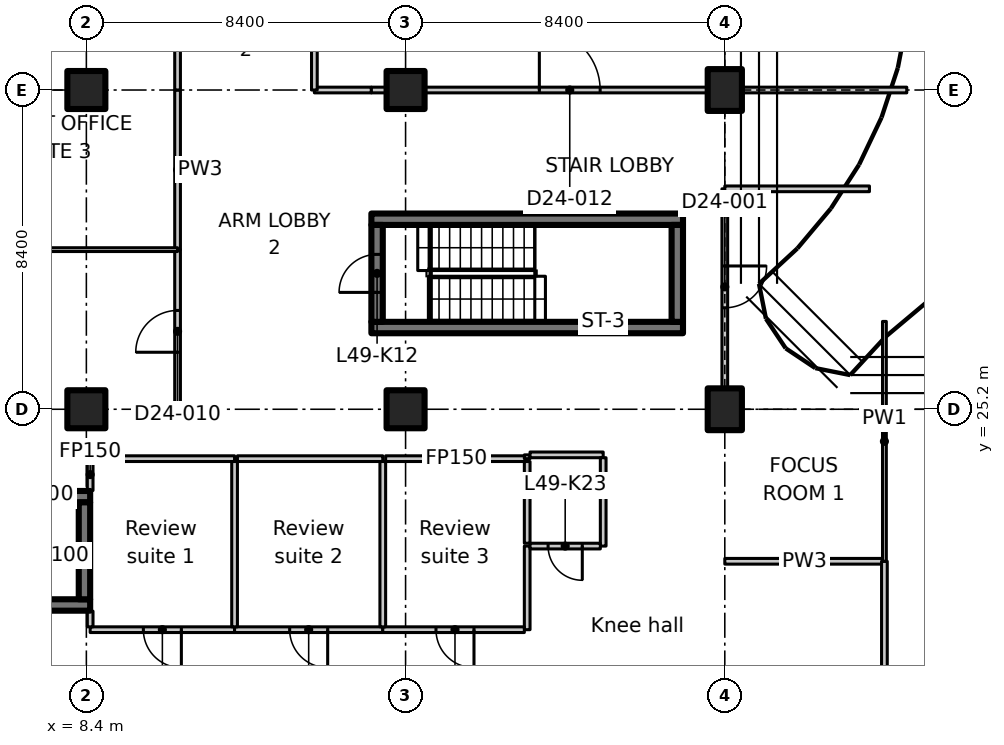
"""IFC4 building model, lengths in metres.
Left out: names, types, materials, properties, quantities, classifications, styles, units other than length and angle.
Written with IfcOpenShell. Run it as: python <this file> out.ifc"""

import sys

from ifc_helpers import new_model, si_unit, direction, frame, frame_2d, origin, origin_2d, place, context, subcontext, project, spatial, polyline, rectangle, outline, extrude, element, fill, save


model = new_model("IFC4")
c1 = context("Model", 3, precision=1e-05, world=origin(), true_north=direction((0.0, 1.0)))
c2 = subcontext(c1, "Body", "Model", "MODEL_VIEW")
j1 = project(units=[si_unit("LENGTHUNIT", "METRE"), si_unit("PLANEANGLEUNIT", "RADIAN")], contexts=[c1])
p1 = place(None, origin())
s1 = spatial("IfcSite", under=j1, at=p1, CompositionType="ELEMENT")
p2 = place(p1, origin())
s2 = spatial("IfcBuilding", under=s1, at=p2, CompositionType="ELEMENT")
p3 = place(p2, frame((0.0, 0.0, 195.6)))
s3 = spatial("IfcBuildingStorey", under=s2, at=p3, CompositionType="ELEMENT", Elevation=195.6)
for number, where, z_axis, x_axis in (
    (1, (8.4, 25.2, 0.0), (0.0, 0.0, 1.0), (1.0, 0.0, 0.0)),
    (2, (8.4, 33.6, 0.0), (0.0, 0.0, 1.0), (1.0, 0.0, 0.0)),
    (3, (16.8, 25.2, 0.0), (0.0, 0.0, 1.0), (1.0, 0.0, 0.0)),
    (4, (16.8, 33.6, 0.0), (0.0, 0.0, 1.0), (1.0, 0.0, 0.0)),
):
    element("IfcColumn", number, at=place(p3, frame(where, z_axis=z_axis, x_axis=x_axis)), inside=s3, PredefinedType="COLUMN", context=c2, shape_type="SweptSolid", body=[
        extrude(rectangle(XDim=1.0, YDim=1.0, at=origin_2d()), origin(), (0.0, 0.0, 1.0), 3.35),
    ])
for number, where, z_axis, x_axis in (
    (5, (25.2, 25.2, 0.0), (0.0, 0.0, 1.0), (1.0, 0.0, 0.0)),
    (6, (25.2, 33.6, 0.0), (0.0, 0.0, 1.0), (1.0, 0.0, 0.0)),
):
    element("IfcColumn", number, at=place(p3, frame(where, z_axis=z_axis, x_axis=x_axis)), inside=s3, PredefinedType="COLUMN", context=c2, shape_type="SweptSolid", body=[
        extrude(rectangle(XDim=0.9, YDim=1.1, at=origin_2d()), origin(), (0.0, 0.0, 1.0), 3.35),
    ])
p4 = place(p3, frame((8.5, 20.05, 0.0), z_axis=(0.0, 0.0, 1.0), x_axis=(-1.0, 0.0, 0.0)))
e7 = element("IfcWall", 7, at=p4, inside=s3, PredefinedType="SHEAR", context=c2, shape_type="SweptSolid", body=[
    extrude(rectangle(XDim=8.2, YDim=0.3, at=frame_2d((4.1, 0.0))), origin(), (0.0, 0.0, 1.0), 3.35),
])
p5 = place(p4, frame((6.8, 0.0, 0.0)))
e8 = element("IfcOpeningElement", 8, at=p5, cuts=e7, PredefinedType="OPENING", context=c2, shape_type="SweptSolid", body=[
    extrude(rectangle(XDim=1.0, YDim=2.1, at=frame_2d((0.5, 1.05))), frame((0.0, 0.16, 0.0), z_axis=(0.0, -1.0, 0.0), x_axis=(1.0, 0.0, 0.0)), (0.0, 0.0, 1.0), 0.32),
])
p6 = place(p3, frame((0.3, 22.9, 0.0), z_axis=(0.0, 0.0, 1.0), x_axis=(1.0, 0.0, 0.0)))
e9 = element("IfcWall", 9, at=p6, inside=s3, PredefinedType="SHEAR", context=c2, shape_type="SweptSolid", body=[
    extrude(rectangle(XDim=8.2, YDim=0.3, at=frame_2d((4.1, 0.0))), origin(), (0.0, 0.0, 1.0), 3.35),
])
p7 = place(p6, frame((0.4, 0.0, 0.0)))
e10 = element("IfcOpeningElement", 10, at=p7, cuts=e9, PredefinedType="OPENING", context=c2, shape_type="SweptSolid", body=[
    extrude(rectangle(XDim=1.0, YDim=2.1, at=frame_2d((0.5, 1.05))), frame((0.0, 0.16, 0.0), z_axis=(0.0, -1.0, 0.0), x_axis=(1.0, 0.0, 0.0)), (0.0, 0.0, 1.0), 0.32),
])
p8 = place(p3, frame((8.35, 20.2, 0.0), z_axis=(0.0, 0.0, 1.0), x_axis=(0.0, 1.0, 0.0)))
e11 = element("IfcWall", 11, at=p8, inside=s3, PredefinedType="SHEAR", context=c2, shape_type="SweptSolid", body=[
    extrude(rectangle(XDim=2.55, YDim=0.3, at=frame_2d((1.275, 0.0))), origin(), (0.0, 0.0, 1.0), 3.35),
])
for number, where, z_axis, x_axis in (
    (12, (15.9, 27.35, 0.0), (0.0, 0.0, 1.0), (1.0, 0.0, 0.0)),
    (13, (15.9, 30.2, 0.0), (0.0, 0.0, 1.0), (1.0, 0.0, 0.0)),
):
    element("IfcWall", number, at=place(p3, frame(where, z_axis=z_axis, x_axis=x_axis)), inside=s3, PredefinedType="SHEAR", context=c2, shape_type="SweptSolid", body=[
        extrude(rectangle(XDim=8.2, YDim=0.3, at=frame_2d((4.1, 0.0))), origin(), (0.0, 0.0, 1.0), 3.35),
    ])
p9 = place(p3, frame((16.05, 27.5, 0.0), z_axis=(0.0, 0.0, 1.0), x_axis=(0.0, 1.0, 0.0)))
e14 = element("IfcWall", 14, at=p9, inside=s3, PredefinedType="SHEAR", context=c2, shape_type="SweptSolid", body=[
    extrude(rectangle(XDim=2.55, YDim=0.3, at=frame_2d((1.275, 0.0))), origin(), (0.0, 0.0, 1.0), 3.35),
])
p10 = place(p9, frame((0.775, 0.0, 0.0)))
e15 = element("IfcOpeningElement", 15, at=p10, cuts=e14, PredefinedType="OPENING", context=c2, shape_type="SweptSolid", body=[
    extrude(rectangle(XDim=1.0, YDim=2.1, at=frame_2d((0.5, 1.05))), frame((0.0, 0.16, 0.0), z_axis=(0.0, -1.0, 0.0), x_axis=(1.0, 0.0, 0.0)), (0.0, 0.0, 1.0), 0.32),
])
p11 = place(p3, frame((23.95, 27.5, 0.0), z_axis=(0.0, 0.0, 1.0), x_axis=(0.0, 1.0, 0.0)))
e16 = element("IfcWall", 16, at=p11, inside=s3, PredefinedType="SHEAR", context=c2, shape_type="SweptSolid", body=[
    extrude(rectangle(XDim=2.55, YDim=0.3, at=frame_2d((1.275, 0.0))), origin(), (0.0, 0.0, 1.0), 3.35),
])
p12 = place(p3, frame((12.3, 19.4, 0.0), z_axis=(0.0, 0.0, 1.0), x_axis=(-1.0, 0.0, 0.0)))
e17 = element("IfcWall", 17, at=p12, inside=s3, PredefinedType="PARTITIONING", context=c2, shape_type="SweptSolid", body=[
    extrude(rectangle(XDim=3.8, YDim=0.15, at=frame_2d((1.9, 0.0))), origin(), (0.0, 0.0, 1.0), 3.35),
])
p13 = place(p12, frame((1.4, 0.0, 0.0)))
e18 = element("IfcOpeningElement", 18, at=p13, cuts=e17, PredefinedType="OPENING", context=c2, shape_type="SweptSolid", body=[
    extrude(rectangle(XDim=1.0, YDim=2.1, at=frame_2d((0.5, 1.05))), frame((0.0, 0.085, 0.0), z_axis=(0.0, -1.0, 0.0), x_axis=(1.0, 0.0, 0.0)), (0.0, 0.0, 1.0), 0.17),
])
p14 = place(p3, frame((8.5, 19.475, 0.0), z_axis=(0.0, 0.0, 1.0), x_axis=(0.0, 1.0, 0.0)))
e19 = element("IfcWall", 19, at=p14, inside=s3, PredefinedType="PARTITIONING", context=c2, shape_type="SweptSolid", body=[
    extrude(rectangle(XDim=0.413, YDim=0.15, at=frame_2d((0.207, 0.0))), origin(), (0.0, 0.0, 1.0), 3.35),
])
p15 = place(p3, frame((8.5, 23.062, 0.0), z_axis=(0.0, 0.0, 1.0), x_axis=(0.0, 1.0, 0.0)))
e20 = element("IfcWall", 20, at=p15, inside=s3, PredefinedType="PARTITIONING", context=c2, shape_type="SweptSolid", body=[
    extrude(rectangle(XDim=0.838, YDim=0.15, at=frame_2d((0.419, 0.0))), origin(), (0.0, 0.0, 1.0), 3.35),
])
p16 = place(p3, frame((8.575, 23.9, 0.0), z_axis=(0.0, 0.0, 1.0), x_axis=(1.0, 0.0, 0.0)))
e21 = element("IfcWall", 21, at=p16, inside=s3, PredefinedType="PARTITIONING", context=c2, shape_type="SweptSolid", body=[
    extrude(rectangle(XDim=3.725, YDim=0.15, at=frame_2d((1.863, 0.0))), origin(), (0.0, 0.0, 1.0), 3.35),
])
p17 = place(p3, frame((16.2, 19.4, 0.0), z_axis=(0.0, 0.0, 1.0), x_axis=(-1.0, 0.0, 0.0)))
e22 = element("IfcWall", 22, at=p17, inside=s3, PredefinedType="PARTITIONING", context=c2, shape_type="SweptSolid", body=[
    extrude(rectangle(XDim=3.9, YDim=0.15, at=frame_2d((1.95, 0.0))), origin(), (0.0, 0.0, 1.0), 3.35),
])
p18 = place(p17, frame((1.45, 0.0, 0.0)))
e23 = element("IfcOpeningElement", 23, at=p18, cuts=e22, PredefinedType="OPENING", context=c2, shape_type="SweptSolid", body=[
    extrude(rectangle(XDim=1.0, YDim=2.1, at=frame_2d((0.5, 1.05))), frame((0.0, 0.085, 0.0), z_axis=(0.0, -1.0, 0.0), x_axis=(1.0, 0.0, 0.0)), (0.0, 0.0, 1.0), 0.17),
])
p19 = place(p3, frame((12.3, 23.825, 0.0), z_axis=(0.0, 0.0, 1.0), x_axis=(0.0, -1.0, 0.0)))
e24 = element("IfcWall", 24, at=p19, inside=s3, PredefinedType="PARTITIONING", context=c2, shape_type="SweptSolid", body=[
    extrude(rectangle(XDim=4.35, YDim=0.15, at=frame_2d((2.175, 0.0))), origin(), (0.0, 0.0, 1.0), 3.35),
])
p20 = place(p3, frame((12.375, 23.9, 0.0), z_axis=(0.0, 0.0, 1.0), x_axis=(1.0, 0.0, 0.0)))
e25 = element("IfcWall", 25, at=p20, inside=s3, PredefinedType="PARTITIONING", context=c2, shape_type="SweptSolid", body=[
    extrude(rectangle(XDim=3.825, YDim=0.15, at=frame_2d((1.913, 0.0))), origin(), (0.0, 0.0, 1.0), 3.35),
])
p21 = place(p3, frame((20.0, 21.6, 0.0), z_axis=(0.0, 0.0, 1.0), x_axis=(0.0, -1.0, 0.0)))
e26 = element("IfcWall", 26, at=p21, inside=s3, PredefinedType="PARTITIONING", context=c2, shape_type="SweptSolid", body=[
    extrude(rectangle(XDim=2.2, YDim=0.15, at=frame_2d((1.1, 0.0))), origin(), (0.0, 0.0, 1.0), 3.35),
])
p22 = place(p3, frame((19.925, 19.4, 0.0), z_axis=(0.0, 0.0, 1.0), x_axis=(-1.0, 0.0, 0.0)))
e27 = element("IfcWall", 27, at=p22, inside=s3, PredefinedType="PARTITIONING", context=c2, shape_type="SweptSolid", body=[
    extrude(rectangle(XDim=3.725, YDim=0.15, at=frame_2d((1.863, 0.0))), origin(), (0.0, 0.0, 1.0), 3.35),
])
p23 = place(p22, frame((1.325, 0.0, 0.0)))
e28 = element("IfcOpeningElement", 28, at=p23, cuts=e27, PredefinedType="OPENING", context=c2, shape_type="SweptSolid", body=[
    extrude(rectangle(XDim=1.0, YDim=2.1, at=frame_2d((0.5, 1.05))), frame((0.0, 0.085, 0.0), z_axis=(0.0, -1.0, 0.0), x_axis=(1.0, 0.0, 0.0)), (0.0, 0.0, 1.0), 0.17),
])
p24 = place(p3, frame((16.2, 23.825, 0.0), z_axis=(0.0, 0.0, 1.0), x_axis=(0.0, -1.0, 0.0)))
e29 = element("IfcWall", 29, at=p24, inside=s3, PredefinedType="PARTITIONING", context=c2, shape_type="SweptSolid", body=[
    extrude(rectangle(XDim=4.35, YDim=0.15, at=frame_2d((2.175, 0.0))), origin(), (0.0, 0.0, 1.0), 3.35),
])
p25 = place(p3, frame((16.275, 23.9, 0.0), z_axis=(0.0, 0.0, 1.0), x_axis=(1.0, 0.0, 0.0)))
e30 = element("IfcWall", 30, at=p25, inside=s3, PredefinedType="PARTITIONING", context=c2, shape_type="SweptSolid", body=[
    extrude(rectangle(XDim=3.725, YDim=0.15, at=frame_2d((1.863, 0.0))), origin(), (0.0, 0.0, 1.0), 3.35),
])
p26 = place(p3, frame((20.0, 23.9, 0.0), z_axis=(0.0, 0.0, 1.0), x_axis=(0.0, 1.0, 0.0)))
e31 = element("IfcWall", 31, at=p26, inside=s3, PredefinedType="PARTITIONING", context=c2, shape_type="SweptSolid", body=[
    extrude(rectangle(XDim=0.1, YDim=0.15, at=frame_2d((0.05, 0.0))), origin(), (0.0, 0.0, 1.0), 3.35),
])
p27 = place(p3, frame((20.075, 24.0, 0.0), z_axis=(0.0, 0.0, 1.0), x_axis=(1.0, 0.0, 0.0)))
e32 = element("IfcWall", 32, at=p27, inside=s3, PredefinedType="PARTITIONING", context=c2, shape_type="SweptSolid", body=[
    extrude(rectangle(XDim=1.925, YDim=0.15, at=frame_2d((0.962, 0.0))), origin(), (0.0, 0.0, 1.0), 3.35),
])
p28 = place(p3, frame((22.0, 23.925, 0.0), z_axis=(0.0, 0.0, 1.0), x_axis=(0.0, -1.0, 0.0)))
e33 = element("IfcWall", 33, at=p28, inside=s3, PredefinedType="PARTITIONING", context=c2, shape_type="SweptSolid", body=[
    extrude(rectangle(XDim=2.325, YDim=0.15, at=frame_2d((1.163, 0.0))), origin(), (0.0, 0.0, 1.0), 3.35),
])
p29 = place(p3, frame((21.925, 21.6, 0.0), z_axis=(0.0, 0.0, 1.0), x_axis=(-1.0, 0.0, 0.0)))
e34 = element("IfcWall", 34, at=p29, inside=s3, PredefinedType="PARTITIONING", context=c2, shape_type="SweptSolid", body=[
    extrude(rectangle(XDim=1.85, YDim=0.15, at=frame_2d((0.925, 0.0))), origin(), (0.0, 0.0, 1.0), 3.35),
])
p30 = place(p29, frame((0.475, 0.0, 0.0)))
e35 = element("IfcOpeningElement", 35, at=p30, cuts=e34, PredefinedType="OPENING", context=c2, shape_type="SweptSolid", body=[
    extrude(rectangle(XDim=0.9, YDim=2.1, at=frame_2d((0.45, 1.05))), frame((0.0, 0.085, 0.0), z_axis=(0.0, -1.0, 0.0), x_axis=(1.0, 0.0, 0.0)), (0.0, 0.0, 1.0), 0.17),
])
p31 = place(p3, frame((20.0, 21.675, 0.0), z_axis=(0.0, 0.0, 1.0), x_axis=(0.0, 1.0, 0.0)))
e36 = element("IfcWall", 36, at=p31, inside=s3, PredefinedType="PARTITIONING", context=c2, shape_type="SweptSolid", body=[
    extrude(rectangle(XDim=2.15, YDim=0.15, at=frame_2d((1.075, 0.0))), origin(), (0.0, 0.0, 1.0), 3.35),
])
p32 = place(p3, frame((25.2, 21.2, 0.0), z_axis=(0.0, 0.0, 1.0), x_axis=(1.0, 0.0, 0.0)))
e37 = element("IfcWall", 37, at=p32, inside=s3, PredefinedType="PARTITIONING", context=c2, shape_type="SweptSolid", body=[
    extrude(rectangle(XDim=4.2, YDim=0.15, at=frame_2d((2.1, 0.0))), origin(), (0.0, 0.0, 1.0), 3.33),
])
p33 = place(p3, frame((29.4, 21.2, 0.0), z_axis=(0.0, 0.0, 1.0), x_axis=(0.0, -1.0, 0.0)))
e38 = element("IfcWall", 38, at=p33, inside=s3, PredefinedType="PARTITIONING", context=c2, shape_type="SweptSolid", body=[
    extrude(rectangle(XDim=8.2, YDim=0.15, at=frame_2d((4.1, 0.0))), origin(), (0.0, 0.0, 1.0), 3.33),
])
p34 = place(p3, frame((29.4, 27.511, 0.0), z_axis=(0.0, 0.0, 1.0), x_axis=(0.0, -1.0, 0.0)))
e39 = element("IfcWall", 39, at=p34, inside=s3, PredefinedType="PARTITIONING", context=c2, shape_type="SweptSolid", body=[
    extrude(outline(polyline([(0.0, 0.0), (6.311, 0.0), (6.311, 3.33), (2.761, 3.33), (2.759, 2.98), (1.863, 2.98), (1.861, 3.33), (0.236, 3.33), (0.0, 3.33), (0.0, 0.0)])), frame((0.0, 0.05, 0.0), z_axis=(0.0, -1.0, 0.0), x_axis=(1.0, 0.0, 0.0)), (0.0, 0.0, 1.0), 0.1),
])
p35 = place(p3, frame((25.2, 31.0, 0.0), z_axis=(0.0, 0.0, 1.0), x_axis=(0.0, -1.0, 0.0)))
e40 = element("IfcWall", 40, at=p35, inside=s3, PredefinedType="PARTITIONING", context=c2, shape_type="SweptSolid", body=[
    extrude(outline(polyline([(0.0, 0.0), (5.23, 0.0), (5.23, 2.98), (0.0, 2.98), (0.0, 0.0)])), frame((0.0, 0.075, 0.0), z_axis=(0.0, -1.0, 0.0), x_axis=(1.0, 0.0, 0.0)), (0.0, 0.0, 1.0), 0.15),
])
p36 = place(p35, frame((2.03, 0.0, 0.0)))
e41 = element("IfcOpeningElement", 41, at=p36, cuts=e40, PredefinedType="OPENING", context=c2, shape_type="SweptSolid", body=[
    extrude(rectangle(XDim=1.1, YDim=2.1, at=frame_2d((0.55, 1.05))), frame((0.0, 0.085, 0.0), z_axis=(0.0, -1.0, 0.0), x_axis=(1.0, 0.0, 0.0)), (0.0, 0.0, 1.0), 0.17),
])
p37 = place(p3, frame((25.2, 31.0, 0.0), z_axis=(0.0, 0.0, 1.0), x_axis=(1.0, 0.0, 0.0)))
e42 = element("IfcWall", 42, at=p37, inside=s3, PredefinedType="PARTITIONING", context=c2, shape_type="SweptSolid", body=[
    extrude(rectangle(XDim=3.806, YDim=0.15, at=frame_2d((1.903, 0.0))), origin(), (0.0, 0.0, 1.0), 2.98),
])
p38 = place(p3, frame((10.8, 25.2, 0.0), z_axis=(0.0, 0.0, 1.0), x_axis=(0.0, 1.0, 0.0)))
e43 = element("IfcWall", 43, at=p38, inside=s3, PredefinedType="PARTITIONING", context=c2, shape_type="SweptSolid", body=[
    extrude(rectangle(XDim=4.2, YDim=0.15, at=frame_2d((2.1, 0.0))), origin(), (0.0, 0.0, 1.0), 3.33),
])
p39 = place(p38, frame((1.5, 0.0, 0.0)))
e44 = element("IfcOpeningElement", 44, at=p39, cuts=e43, PredefinedType="OPENING", context=c2, shape_type="SweptSolid", body=[
    extrude(rectangle(XDim=1.1, YDim=2.1, at=frame_2d((0.55, 1.05))), frame((0.0, 0.085, 0.0), z_axis=(0.0, -1.0, 0.0), x_axis=(1.0, 0.0, 0.0)), (0.0, 0.0, 1.0), 0.17),
])
p40 = place(p3, frame((10.8, 29.4, 0.0), z_axis=(0.0, 0.0, 1.0), x_axis=(0.0, 1.0, 0.0)))
e45 = element("IfcWall", 45, at=p40, inside=s3, PredefinedType="PARTITIONING", context=c2, shape_type="SweptSolid", body=[
    extrude(rectangle(XDim=4.2, YDim=0.15, at=frame_2d((2.1, 0.0))), origin(), (0.0, 0.0, 1.0), 3.33),
])
p41 = place(p3, frame((14.4, 33.6, 0.0), z_axis=(0.0, 0.0, 1.0), x_axis=(1.0, 0.0, 0.0)))
e46 = element("IfcWall", 46, at=p41, inside=s3, PredefinedType="PARTITIONING", context=c2, shape_type="SweptSolid", body=[
    extrude(rectangle(XDim=1.5, YDim=0.15, at=frame_2d((0.75, 0.0))), origin(), (0.0, 0.0, 1.0), 3.33),
])
p42 = place(p3, frame((15.9, 33.6, 0.0), z_axis=(0.0, 0.0, 1.0), x_axis=(1.0, 0.0, 0.0)))
e47 = element("IfcWall", 47, at=p42, inside=s3, PredefinedType="PARTITIONING", context=c2, shape_type="SweptSolid", body=[
    extrude(rectangle(XDim=0.38, YDim=0.15, at=frame_2d((0.19, 0.0))), origin(), (0.0, 0.0, 1.0), 3.33),
])
p43 = place(p3, frame((17.32, 33.6, 0.0), z_axis=(0.0, 0.0, 1.0), x_axis=(1.0, 0.0, 0.0)))
e48 = element("IfcWall", 48, at=p43, inside=s3, PredefinedType="PARTITIONING", context=c2, shape_type="SweptSolid", body=[
    extrude(rectangle(XDim=7.41, YDim=0.15, at=frame_2d((3.705, 0.0))), origin(), (0.0, 0.0, 1.0), 3.33),
])
p44 = place(p43, frame((3.0, 0.0, 0.0)))
e49 = element("IfcOpeningElement", 49, at=p44, cuts=e48, PredefinedType="OPENING", context=c2, shape_type="SweptSolid", body=[
    extrude(rectangle(XDim=1.6, YDim=2.1, at=frame_2d((0.8, 1.05))), frame((0.0, 0.085, 0.0), z_axis=(0.0, -1.0, 0.0), x_axis=(1.0, 0.0, 0.0)), (0.0, 0.0, 1.0), 0.17),
])
p45 = place(p3, frame((25.67, 33.6, 0.0), z_axis=(0.0, 0.0, 1.0), x_axis=(1.0, 0.0, 0.0)))
e50 = element("IfcWall", 50, at=p45, inside=s3, PredefinedType="PARTITIONING", context=c2, shape_type="SweptSolid", body=[
    extrude(rectangle(XDim=4.318, YDim=0.15, at=frame_2d((2.159, 0.0))), origin(), (0.0, 0.0, 1.0), 2.98),
])
p46 = place(p3, frame((10.8, 33.6, 0.0), z_axis=(0.0, 0.0, 1.0), x_axis=(0.0, 1.0, 0.0)))
e51 = element("IfcWall", 51, at=p46, inside=s3, PredefinedType="PARTITIONING", context=c2, shape_type="SweptSolid", body=[
    extrude(rectangle(XDim=12.6, YDim=0.15, at=frame_2d((6.3, 0.0))), origin(), (0.0, 0.0, 1.0), 3.33),
])
p47 = place(p46, frame((5.4, 0.0, 0.0)))
e52 = element("IfcOpeningElement", 52, at=p47, cuts=e51, PredefinedType="OPENING", context=c2, shape_type="SweptSolid", body=[
    extrude(rectangle(XDim=2.0, YDim=2.4, at=frame_2d((1.0, 1.2))), frame((0.0, 0.085, 0.0), z_axis=(0.0, -1.0, 0.0), x_axis=(1.0, 0.0, 0.0)), (0.0, 0.0, 1.0), 0.17),
])
p48 = place(p3, frame((14.4, 37.8, 0.0), z_axis=(0.0, 0.0, 1.0), x_axis=(0.0, -1.0, 0.0)))
e53 = element("IfcWall", 53, at=p48, inside=s3, PredefinedType="PARTITIONING", context=c2, shape_type="SweptSolid", body=[
    extrude(rectangle(XDim=4.2, YDim=0.15, at=frame_2d((2.1, 0.0))), origin(), (0.0, 0.0, 1.0), 3.33),
])
p49 = place(p3, frame((-1.1, 29.4, 0.0), z_axis=(0.0, 0.0, 1.0), x_axis=(1.0, 0.0, 0.0)))
e54 = element("IfcWall", 54, at=p49, inside=s3, PredefinedType="PARTITIONING", context=c2, shape_type="SweptSolid", body=[
    extrude(outline(polyline([(0.0, 0.0), (11.9, 0.0), (11.9, 3.33), (1.55, 3.33), (1.548, 2.98), (0.652, 2.98), (0.65, 3.33), (0.0, 3.33), (0.0, 0.0)])), frame((0.0, 0.05, 0.0), z_axis=(0.0, -1.0, 0.0), x_axis=(1.0, 0.0, 0.0)), (0.0, 0.0, 1.0), 0.1),
])
p50 = place(p10, origin())
e55 = element("IfcDoor", 55, at=p50, inside=s3, OperationType="SINGLE_SWING_RIGHT", PredefinedType="DOOR", context=c2, shape_type="SweptSolid", body=[
    extrude(rectangle(XDim=1.0, YDim=2.1, at=frame_2d((0.5, 1.05))), frame((0.0, 0.025, 0.0), z_axis=(0.0, -1.0, 0.0), x_axis=(1.0, 0.0, 0.0)), (0.0, 0.0, 1.0), 0.05),
])
fill(e15, e55)
p51 = place(p30, origin())
e56 = element("IfcDoor", 56, at=p51, inside=s3, OperationType="SINGLE_SWING_LEFT", PredefinedType="DOOR", context=c2, shape_type="SweptSolid", body=[
    extrude(rectangle(XDim=0.9, YDim=2.1, at=frame_2d((0.45, 1.05))), frame((0.0, 0.025, 0.0), z_axis=(0.0, -1.0, 0.0), x_axis=(1.0, 0.0, 0.0)), (0.0, 0.0, 1.0), 0.05),
])
fill(e35, e56)
p52 = place(p13, origin())
e57 = element("IfcDoor", 57, at=p52, inside=s3, OperationType="SINGLE_SWING_RIGHT", PredefinedType="DOOR", context=c2, shape_type="SweptSolid", body=[
    extrude(rectangle(XDim=1.0, YDim=2.1, at=frame_2d((0.5, 1.05))), frame((0.0, 0.025, 0.0), z_axis=(0.0, -1.0, 0.0), x_axis=(1.0, 0.0, 0.0)), (0.0, 0.0, 1.0), 0.05),
])
fill(e18, e57)
p53 = place(p18, origin())
e58 = element("IfcDoor", 58, at=p53, inside=s3, OperationType="SINGLE_SWING_LEFT", PredefinedType="DOOR", context=c2, shape_type="SweptSolid", body=[
    extrude(rectangle(XDim=1.0, YDim=2.1, at=frame_2d((0.5, 1.05))), frame((0.0, 0.025, 0.0), z_axis=(0.0, -1.0, 0.0), x_axis=(1.0, 0.0, 0.0)), (0.0, 0.0, 1.0), 0.05),
])
fill(e23, e58)
p54 = place(p23, origin())
e59 = element("IfcDoor", 59, at=p54, inside=s3, OperationType="SINGLE_SWING_RIGHT", PredefinedType="DOOR", context=c2, shape_type="SweptSolid", body=[
    extrude(rectangle(XDim=1.0, YDim=2.1, at=frame_2d((0.5, 1.05))), frame((0.0, 0.025, 0.0), z_axis=(0.0, -1.0, 0.0), x_axis=(1.0, 0.0, 0.0)), (0.0, 0.0, 1.0), 0.05),
])
fill(e28, e59)
p55 = place(p36, origin())
e60 = element("IfcDoor", 60, at=p55, inside=s3, OperationType="SINGLE_SWING_RIGHT", PredefinedType="DOOR", context=c2, shape_type="SweptSolid", body=[
    extrude(rectangle(XDim=1.1, YDim=2.1, at=frame_2d((0.55, 1.05))), frame((0.0, 0.025, 0.0), z_axis=(0.0, -1.0, 0.0), x_axis=(1.0, 0.0, 0.0)), (0.0, 0.0, 1.0), 0.05),
])
fill(e41, e60)
p56 = place(p39, origin())
e61 = element("IfcDoor", 61, at=p56, inside=s3, OperationType="SINGLE_SWING_LEFT", PredefinedType="DOOR", context=c2, shape_type="SweptSolid", body=[
    extrude(rectangle(XDim=1.1, YDim=2.1, at=frame_2d((0.55, 1.05))), frame((0.0, 0.025, 0.0), z_axis=(0.0, -1.0, 0.0), x_axis=(1.0, 0.0, 0.0)), (0.0, 0.0, 1.0), 0.05),
])
fill(e44, e61)
p57 = place(p44, origin())
e62 = element("IfcDoor", 62, at=p57, inside=s3, OperationType="DOUBLE_DOOR_SINGLE_SWING", PredefinedType="DOOR", context=c2, shape_type="SweptSolid", body=[
    extrude(rectangle(XDim=1.6, YDim=2.1, at=frame_2d((0.8, 1.05))), frame((0.0, 0.025, 0.0), z_axis=(0.0, -1.0, 0.0), x_axis=(1.0, 0.0, 0.0)), (0.0, 0.0, 1.0), 0.05),
])
fill(e49, e62)
save(model, sys.argv[1])
